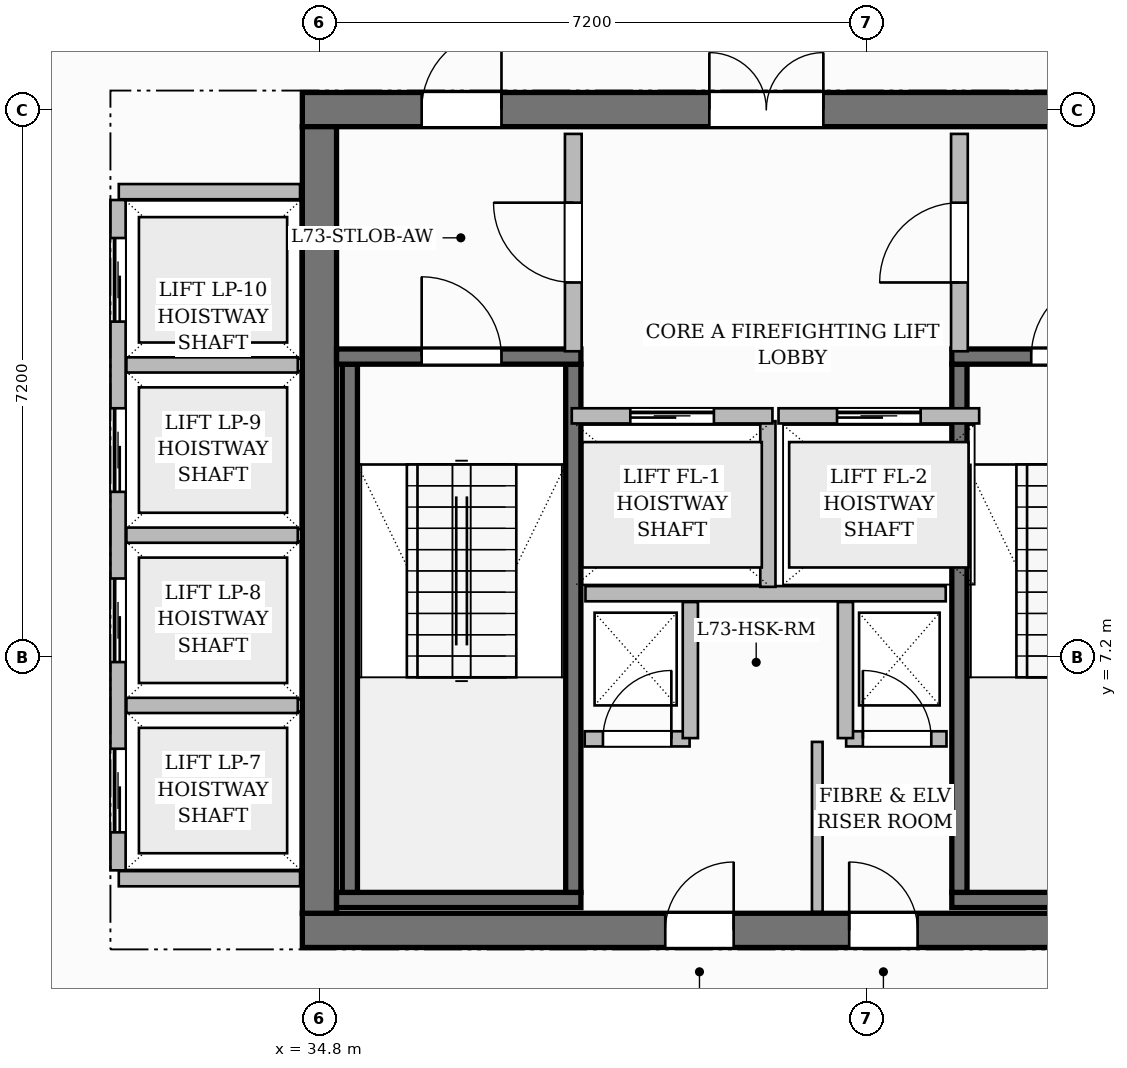
"""IFC4 building model, lengths in metres.
Left out: names, types, materials, properties, quantities, classifications, styles, units other than length and angle.
Written with IfcOpenShell. Run it as: python <this file> out.ifc"""

import sys

from ifc_helpers import new_model, si_unit, direction, frame, frame_2d, origin, place, context, subcontext, project, spatial, rectangle, extrude, source, transform, mapped, element, fill, save


model = new_model("IFC4")
c1 = context("Model", 3, precision=1e-05, world=origin(), true_north=direction((0.0, 1.0)))
c2 = subcontext(c1, "Body", "Model", "MODEL_VIEW")
j1 = project(units=[si_unit("LENGTHUNIT", "METRE"), si_unit("PLANEANGLEUNIT", "RADIAN")], contexts=[c1])
p1 = place(None, origin())
s1 = spatial("IfcSite", under=j1, at=p1, CompositionType="ELEMENT")
p2 = place(p1, origin())
s2 = spatial("IfcBuilding", under=s1, at=p2, CompositionType="ELEMENT")
p3 = place(p2, frame((0.0, 0.0, 290.45)))
s3 = spatial("IfcBuildingStorey", under=s2, at=p3, CompositionType="ELEMENT", Elevation=290.45)
p4 = place(p3, frame((34.575, 3.6, 0.0), z_axis=(0.0, 0.0, 1.0), x_axis=(1.0, 0.0, 0.0)))
e1 = element("IfcWall", 1, at=p4, inside=s3, PredefinedType="SHEAR", context=c2, shape_type="SweptSolid", body=[
    extrude(rectangle(XDim=15.45, YDim=0.45, at=frame_2d((7.725, 0.0))), origin(), (0.0, 0.0, 1.0), 3.85),
])
p5 = place(p4, frame((4.775, 0.0, 0.0)))
e2 = element("IfcOpeningElement", 2, at=p5, cuts=e1, PredefinedType="OPENING", context=c2, shape_type="SweptSolid", body=[
    extrude(rectangle(XDim=0.9, YDim=2.1, at=frame_2d((0.45, 1.05))), frame((0.0, 0.235, 0.0), z_axis=(0.0, -1.0, 0.0), x_axis=(1.0, 0.0, 0.0)), (0.0, 0.0, 1.0), 0.47),
])
p6 = place(p4, frame((7.195, 0.0, 0.0)))
e3 = element("IfcOpeningElement", 3, at=p6, cuts=e1, PredefinedType="OPENING", context=c2, shape_type="SweptSolid", body=[
    extrude(rectangle(XDim=0.9, YDim=2.1, at=frame_2d((0.45, 1.05))), frame((0.0, 0.235, 0.0), z_axis=(0.0, -1.0, 0.0), x_axis=(1.0, 0.0, 0.0)), (0.0, 0.0, 1.0), 0.47),
])
p7 = place(p3, frame((34.575, 14.4, 0.0), z_axis=(0.0, 0.0, 1.0), x_axis=(1.0, 0.0, 0.0)))
e4 = element("IfcWall", 4, at=p7, inside=s3, PredefinedType="SHEAR", context=c2, shape_type="SweptSolid", body=[
    extrude(rectangle(XDim=15.45, YDim=0.45, at=frame_2d((7.725, 0.0))), origin(), (0.0, 0.0, 1.0), 3.85),
])
p8 = place(p7, frame((5.355, 0.0, 0.0)))
e5 = element("IfcOpeningElement", 5, at=p8, cuts=e4, PredefinedType="OPENING", context=c2, shape_type="SweptSolid", body=[
    extrude(rectangle(XDim=1.5, YDim=2.2, at=frame_2d((0.75, 1.1))), frame((0.0, 0.235, 0.0), z_axis=(0.0, -1.0, 0.0), x_axis=(1.0, 0.0, 0.0)), (0.0, 0.0, 1.0), 0.47),
])
p9 = place(p7, frame((1.57, 0.0, 0.0)))
e6 = element("IfcOpeningElement", 6, at=p9, cuts=e4, PredefinedType="OPENING", context=c2, shape_type="SweptSolid", body=[
    extrude(rectangle(XDim=1.05, YDim=2.15, at=frame_2d((0.525, 1.075))), frame((0.0, 0.235, 0.0), z_axis=(0.0, -1.0, 0.0), x_axis=(1.0, 0.0, 0.0)), (0.0, 0.0, 1.0), 0.47),
])
p10 = place(p7, frame((11.2, 0.0, 0.0)))
e7 = element("IfcOpeningElement", 7, at=p10, cuts=e4, PredefinedType="OPENING", context=c2, shape_type="SweptSolid", body=[
    extrude(rectangle(XDim=1.05, YDim=2.15, at=frame_2d((0.525, 1.075))), frame((0.0, 0.235, 0.0), z_axis=(0.0, -1.0, 0.0), x_axis=(1.0, 0.0, 0.0)), (0.0, 0.0, 1.0), 0.47),
])
p11 = place(p3, frame((34.8, 3.825, 0.0), z_axis=(0.0, 0.0, 1.0), x_axis=(0.0, 1.0, 0.0)))
e8 = element("IfcWall", 8, at=p11, inside=s3, PredefinedType="SHEAR", context=c2, shape_type="SweptSolid", body=[
    extrude(rectangle(XDim=10.35, YDim=0.45, at=frame_2d((5.175, 0.0))), origin(), (0.0, 0.0, 1.0), 3.85),
])
p12 = place(p3, frame((35.025, 4.0, 0.0), z_axis=(0.0, 0.0, 1.0), x_axis=(1.0, 0.0, 0.0)))
e9 = element("IfcWall", 9, at=p12, inside=s3, PredefinedType="SHEAR", context=c2, shape_type="SweptSolid", body=[
    extrude(rectangle(XDim=3.215, YDim=0.2, at=frame_2d((1.607, 0.0))), origin(), (0.0, 0.0, 1.0), 3.85),
])
for number, where, z_axis, x_axis in (
    (10, (35.2, 4.1, 0.0), (0.0, 0.0, 1.0), (0.0, 1.0, 0.0)),
    (11, (38.14, 4.1, 0.0), (0.0, 0.0, 1.0), (0.0, 1.0, 0.0)),
):
    element("IfcWall", number, at=place(p3, frame(where, z_axis=z_axis, x_axis=x_axis)), inside=s3, PredefinedType="SHEAR", context=c2, shape_type="SweptSolid", body=[
        extrude(rectangle(XDim=6.95, YDim=0.2, at=frame_2d((3.475, 0.0))), origin(), (0.0, 0.0, 1.0), 3.85),
    ])
p13 = place(p3, frame((35.025, 11.15, 0.0), z_axis=(0.0, 0.0, 1.0), x_axis=(1.0, 0.0, 0.0)))
e12 = element("IfcWall", 12, at=p13, inside=s3, PredefinedType="SHEAR", context=c2, shape_type="SweptSolid", body=[
    extrude(rectangle(XDim=3.215, YDim=0.2, at=frame_2d((1.607, 0.0))), origin(), (0.0, 0.0, 1.0), 3.85),
])
p14 = place(p13, frame((1.12, 0.0, 0.0)))
e13 = element("IfcOpeningElement", 13, at=p14, cuts=e12, PredefinedType="OPENING", context=c2, shape_type="SweptSolid", body=[
    extrude(rectangle(XDim=1.05, YDim=2.2, at=frame_2d((0.525, 1.1))), frame((0.0, 0.11, 0.0), z_axis=(0.0, -1.0, 0.0), x_axis=(1.0, 0.0, 0.0)), (0.0, 0.0, 1.0), 0.22),
])
p15 = place(p3, frame((43.12, 4.0, 0.0), z_axis=(0.0, 0.0, 1.0), x_axis=(1.0, 0.0, 0.0)))
e14 = element("IfcWall", 14, at=p15, inside=s3, PredefinedType="SHEAR", context=c2, shape_type="SweptSolid", body=[
    extrude(rectangle(XDim=6.455, YDim=0.2, at=frame_2d((3.228, 0.0))), origin(), (0.0, 0.0, 1.0), 3.85),
])
p16 = place(p3, frame((43.22, 4.1, 0.0), z_axis=(0.0, 0.0, 1.0), x_axis=(0.0, 1.0, 0.0)))
e15 = element("IfcWall", 15, at=p16, inside=s3, PredefinedType="SHEAR", context=c2, shape_type="SweptSolid", body=[
    extrude(rectangle(XDim=6.95, YDim=0.2, at=frame_2d((3.475, 0.0))), origin(), (0.0, 0.0, 1.0), 3.85),
])
p17 = place(p3, frame((43.12, 11.15, 0.0), z_axis=(0.0, 0.0, 1.0), x_axis=(1.0, 0.0, 0.0)))
e16 = element("IfcWall", 16, at=p17, inside=s3, PredefinedType="SHEAR", context=c2, shape_type="SweptSolid", body=[
    extrude(rectangle(XDim=6.455, YDim=0.2, at=frame_2d((3.228, 0.0))), origin(), (0.0, 0.0, 1.0), 3.85),
])
p18 = place(p17, frame((1.045, 0.0, 0.0)))
e17 = element("IfcOpeningElement", 17, at=p18, cuts=e16, PredefinedType="OPENING", context=c2, shape_type="SweptSolid", body=[
    extrude(rectangle(XDim=1.05, YDim=2.2, at=frame_2d((0.525, 1.1))), frame((0.0, 0.11, 0.0), z_axis=(0.0, -1.0, 0.0), x_axis=(1.0, 0.0, 0.0)), (0.0, 0.0, 1.0), 0.22),
])
p19 = place(p17, frame((4.125, 0.0, 0.0)))
e18 = element("IfcOpeningElement", 18, at=p19, cuts=e16, PredefinedType="OPENING", context=c2, shape_type="SweptSolid", body=[
    extrude(rectangle(XDim=1.05, YDim=2.2, at=frame_2d((0.525, 1.1))), frame((0.0, 0.11, 0.0), z_axis=(0.0, -1.0, 0.0), x_axis=(1.0, 0.0, 0.0)), (0.0, 0.0, 1.0), 0.22),
])
p20 = place(p3, frame((38.3, 8.03, 0.0), z_axis=(0.0, 0.0, 1.0), x_axis=(1.0, 0.0, 0.0)))
e19 = element("IfcWall", 19, at=p20, inside=s3, PredefinedType="PARTITIONING", context=c2, shape_type="SweptSolid", body=[
    extrude(rectangle(XDim=4.74, YDim=0.2, at=frame_2d((2.37, 0.0))), origin(), (0.0, 0.0, 1.0), 3.55),
])
p21 = place(p3, frame((40.7, 8.12, 0.0), z_axis=(0.0, 0.0, 1.0), x_axis=(0.0, 1.0, 0.0)))
e20 = element("IfcWall", 20, at=p21, inside=s3, PredefinedType="PARTITIONING", context=c2, shape_type="SweptSolid", body=[
    extrude(rectangle(XDim=2.18, YDim=0.2, at=frame_2d((1.09, 0.0))), origin(), (0.0, 0.0, 1.0), 3.55),
])
p22 = place(p3, frame((38.14, 11.22, 0.0), z_axis=(0.0, 0.0, 1.0), x_axis=(0.0, 1.0, 0.0)))
e21 = element("IfcWall", 21, at=p22, inside=s3, PredefinedType="PARTITIONING", context=c2, shape_type="SweptSolid", body=[
    extrude(rectangle(XDim=2.86, YDim=0.22, at=frame_2d((1.43, 0.0))), origin(), (0.0, 0.0, 1.0), 3.55),
])
p23 = place(p22, frame((0.905, 0.0, 0.0)))
e22 = element("IfcOpeningElement", 22, at=p23, cuts=e21, PredefinedType="OPENING", context=c2, shape_type="SweptSolid", body=[
    extrude(rectangle(XDim=1.05, YDim=2.15, at=frame_2d((0.525, 1.075))), frame((0.0, 0.12, 0.0), z_axis=(0.0, -1.0, 0.0), x_axis=(1.0, 0.0, 0.0)), (0.0, 0.0, 1.0), 0.24),
])
p24 = place(p3, frame((43.22, 11.22, 0.0), z_axis=(0.0, 0.0, 1.0), x_axis=(0.0, 1.0, 0.0)))
e23 = element("IfcWall", 23, at=p24, inside=s3, PredefinedType="PARTITIONING", context=c2, shape_type="SweptSolid", body=[
    extrude(rectangle(XDim=2.86, YDim=0.22, at=frame_2d((1.43, 0.0))), origin(), (0.0, 0.0, 1.0), 3.55),
])
p25 = place(p24, frame((0.905, 0.0, 0.0)))
e24 = element("IfcOpeningElement", 24, at=p25, cuts=e23, PredefinedType="OPENING", context=c2, shape_type="SweptSolid", body=[
    extrude(rectangle(XDim=1.05, YDim=2.15, at=frame_2d((0.525, 1.075))), frame((0.0, 0.12, 0.0), z_axis=(0.0, -1.0, 0.0), x_axis=(1.0, 0.0, 0.0)), (0.0, 0.0, 1.0), 0.24),
])
p26 = place(p3, frame((38.29, 6.12, 0.0), z_axis=(0.0, 0.0, 1.0), x_axis=(1.0, 0.0, 0.0)))
e25 = element("IfcWall", 25, at=p26, inside=s3, PredefinedType="PARTITIONING", context=c2, shape_type="SweptSolid", body=[
    extrude(rectangle(XDim=1.38, YDim=0.2, at=frame_2d((0.69, 0.0))), origin(), (0.0, 0.0, 1.0), 3.55),
])
p27 = place(p26, frame((0.24, 0.0, 0.0)))
e26 = element("IfcOpeningElement", 26, at=p27, cuts=e25, PredefinedType="OPENING", context=c2, shape_type="SweptSolid", body=[
    extrude(rectangle(XDim=0.9, YDim=2.1, at=frame_2d((0.45, 1.05))), frame((0.0, 0.11, 0.0), z_axis=(0.0, -1.0, 0.0), x_axis=(1.0, 0.0, 0.0)), (0.0, 0.0, 1.0), 0.22),
])
p28 = place(p3, frame((39.68, 6.13, 0.0), z_axis=(0.0, 0.0, 1.0), x_axis=(0.0, 1.0, 0.0)))
e27 = element("IfcWall", 27, at=p28, inside=s3, PredefinedType="PARTITIONING", context=c2, shape_type="SweptSolid", body=[
    extrude(rectangle(XDim=1.79, YDim=0.2, at=frame_2d((0.895, 0.0))), origin(), (0.0, 0.0, 1.0), 3.55),
])
p29 = place(p3, frame((41.73, 6.12, 0.0), z_axis=(0.0, 0.0, 1.0), x_axis=(1.0, 0.0, 0.0)))
e28 = element("IfcWall", 28, at=p29, inside=s3, PredefinedType="PARTITIONING", context=c2, shape_type="SweptSolid", body=[
    extrude(rectangle(XDim=1.32, YDim=0.2, at=frame_2d((0.66, 0.0))), origin(), (0.0, 0.0, 1.0), 3.55),
])
p30 = place(p29, frame((0.22, 0.0, 0.0)))
e29 = element("IfcOpeningElement", 29, at=p30, cuts=e28, PredefinedType="OPENING", context=c2, shape_type="SweptSolid", body=[
    extrude(rectangle(XDim=0.9, YDim=2.1, at=frame_2d((0.45, 1.05))), frame((0.0, 0.11, 0.0), z_axis=(0.0, -1.0, 0.0), x_axis=(1.0, 0.0, 0.0)), (0.0, 0.0, 1.0), 0.22),
])
p31 = place(p3, frame((41.72, 6.13, 0.0), z_axis=(0.0, 0.0, 1.0), x_axis=(0.0, 1.0, 0.0)))
e30 = element("IfcWall", 30, at=p31, inside=s3, PredefinedType="PARTITIONING", context=c2, shape_type="SweptSolid", body=[
    extrude(rectangle(XDim=1.79, YDim=0.2, at=frame_2d((0.895, 0.0))), origin(), (0.0, 0.0, 1.0), 3.55),
])
p32 = place(p3, frame((41.35, 3.845, 0.0), z_axis=(0.0, 0.0, 1.0), x_axis=(0.0, 1.0, 0.0)))
e31 = element("IfcWall", 31, at=p32, inside=s3, PredefinedType="PARTITIONING", context=c2, shape_type="SweptSolid", body=[
    extrude(rectangle(XDim=2.235, YDim=0.14, at=frame_2d((1.118, 0.0))), origin(), (0.0, 0.0, 1.0), 3.55),
])
for number, where, z_axis, x_axis in (
    (32, (32.16, 4.28, 0.0), (0.0, 0.0, 1.0), (1.0, 0.0, 0.0)),
    (33, (32.16, 13.32, 0.0), (0.0, 0.0, 1.0), (1.0, 0.0, 0.0)),
):
    element("IfcWall", number, at=place(p3, frame(where, z_axis=z_axis, x_axis=x_axis)), inside=s3, PredefinedType="PARTITIONING", context=c2, shape_type="SweptSolid", body=[
        extrude(rectangle(XDim=2.385, YDim=0.2, at=frame_2d((1.192, 0.0))), origin(), (0.0, 0.0, 1.0), 3.55),
    ])
p33 = place(p3, frame((32.15, 4.39, 0.0), z_axis=(0.0, 0.0, 1.0), x_axis=(0.0, 1.0, 0.0)))
e34 = element("IfcWall", 34, at=p33, inside=s3, PredefinedType="PARTITIONING", context=c2, shape_type="SweptSolid", body=[
    extrude(rectangle(XDim=8.82, YDim=0.2, at=frame_2d((4.41, 0.0))), origin(), (0.0, 0.0, 1.0), 3.55),
])
p34 = place(p33, frame((0.5, 0.0, 0.0)))
e35 = element("IfcOpeningElement", 35, at=p34, cuts=e34, PredefinedType="OPENING", context=c2, shape_type="SweptSolid", body=[
    extrude(rectangle(XDim=1.1, YDim=2.2, at=frame_2d((0.55, 1.1))), frame((0.0, 0.11, 0.0), z_axis=(0.0, -1.0, 0.0), x_axis=(1.0, 0.0, 0.0)), (0.0, 0.0, 1.0), 0.22),
])
p35 = place(p33, frame((2.74, 0.0, 0.0)))
e36 = element("IfcOpeningElement", 36, at=p35, cuts=e34, PredefinedType="OPENING", context=c2, shape_type="SweptSolid", body=[
    extrude(rectangle(XDim=1.1, YDim=2.2, at=frame_2d((0.55, 1.1))), frame((0.0, 0.11, 0.0), z_axis=(0.0, -1.0, 0.0), x_axis=(1.0, 0.0, 0.0)), (0.0, 0.0, 1.0), 0.22),
])
p36 = place(p33, frame((4.98, 0.0, 0.0)))
e37 = element("IfcOpeningElement", 37, at=p36, cuts=e34, PredefinedType="OPENING", context=c2, shape_type="SweptSolid", body=[
    extrude(rectangle(XDim=1.1, YDim=2.2, at=frame_2d((0.55, 1.1))), frame((0.0, 0.11, 0.0), z_axis=(0.0, -1.0, 0.0), x_axis=(1.0, 0.0, 0.0)), (0.0, 0.0, 1.0), 0.22),
])
p37 = place(p33, frame((7.22, 0.0, 0.0)))
e38 = element("IfcOpeningElement", 38, at=p37, cuts=e34, PredefinedType="OPENING", context=c2, shape_type="SweptSolid", body=[
    extrude(rectangle(XDim=1.1, YDim=2.2, at=frame_2d((0.55, 1.1))), frame((0.0, 0.11, 0.0), z_axis=(0.0, -1.0, 0.0), x_axis=(1.0, 0.0, 0.0)), (0.0, 0.0, 1.0), 0.22),
])
for number, where, z_axis, x_axis in (
    (39, (32.26, 6.56, 0.0), (0.0, 0.0, 1.0), (1.0, 0.0, 0.0)),
    (40, (32.26, 8.8, 0.0), (0.0, 0.0, 1.0), (1.0, 0.0, 0.0)),
    (41, (32.26, 11.04, 0.0), (0.0, 0.0, 1.0), (1.0, 0.0, 0.0)),
):
    element("IfcWall", number, at=place(p3, frame(where, z_axis=z_axis, x_axis=x_axis)), inside=s3, PredefinedType="PARTITIONING", context=c2, shape_type="SweptSolid", body=[
        extrude(rectangle(XDim=2.255, YDim=0.2, at=frame_2d((1.127, 0.0))), origin(), (0.0, 0.0, 1.0), 3.55),
    ])
p38 = place(p3, frame((38.12, 10.37, 0.0), z_axis=(0.0, 0.0, 1.0), x_axis=(1.0, 0.0, 0.0)))
e42 = element("IfcWall", 42, at=p38, inside=s3, PredefinedType="PARTITIONING", context=c2, shape_type="SweptSolid", body=[
    extrude(rectangle(XDim=2.64, YDim=0.2, at=frame_2d((1.32, 0.0))), origin(), (0.0, 0.0, 1.0), 3.55),
])
p39 = place(p38, frame((0.77, 0.0, 0.0)))
e43 = element("IfcOpeningElement", 43, at=p39, cuts=e42, PredefinedType="OPENING", context=c2, shape_type="SweptSolid", body=[
    extrude(rectangle(XDim=1.1, YDim=2.2, at=frame_2d((0.55, 1.1))), frame((0.0, 0.11, 0.0), z_axis=(0.0, -1.0, 0.0), x_axis=(1.0, 0.0, 0.0)), (0.0, 0.0, 1.0), 0.22),
])
p40 = place(p3, frame((40.84, 10.37, 0.0), z_axis=(0.0, 0.0, 1.0), x_axis=(1.0, 0.0, 0.0)))
e44 = element("IfcWall", 44, at=p40, inside=s3, PredefinedType="PARTITIONING", context=c2, shape_type="SweptSolid", body=[
    extrude(rectangle(XDim=2.64, YDim=0.2, at=frame_2d((1.32, 0.0))), origin(), (0.0, 0.0, 1.0), 3.55),
])
p41 = place(p40, frame((0.77, 0.0, 0.0)))
e45 = element("IfcOpeningElement", 45, at=p41, cuts=e44, PredefinedType="OPENING", context=c2, shape_type="SweptSolid", body=[
    extrude(rectangle(XDim=1.1, YDim=2.2, at=frame_2d((0.55, 1.1))), frame((0.0, 0.11, 0.0), z_axis=(0.0, -1.0, 0.0), x_axis=(1.0, 0.0, 0.0)), (0.0, 0.0, 1.0), 0.22),
])
m1 = source(origin(), c2, "Body", "SweptSolid", [
    extrude(rectangle(XDim=1.05, YDim=2.2, at=frame_2d((0.525, 1.1))), frame((0.0, 0.025, 0.0), z_axis=(0.0, -1.0, 0.0), x_axis=(1.0, 0.0, 0.0)), (0.0, 0.0, 1.0), 0.05),
])
p42 = place(p14, origin())
e46 = element("IfcDoor", 46, at=p42, inside=s3, OperationType="SINGLE_SWING_LEFT", PredefinedType="DOOR", context=c2, shape_type="MappedRepresentation", body=[
    mapped(m1, transform((0.0, 0.0, 0.0), scale=1.0)),
])
fill(e13, e46)
p43 = place(p18, origin())
e47 = element("IfcDoor", 47, at=p43, inside=s3, OperationType="SINGLE_SWING_RIGHT", PredefinedType="DOOR", context=c2, shape_type="MappedRepresentation", body=[
    mapped(m1, transform((0.0, 0.0, 0.0), scale=1.0)),
])
fill(e17, e47)
m2 = source(origin(), c2, "Body", "SweptSolid", [
    extrude(rectangle(XDim=1.05, YDim=2.15, at=frame_2d((0.525, 1.075))), frame((0.0, 0.025, 0.0), z_axis=(0.0, -1.0, 0.0), x_axis=(1.0, 0.0, 0.0)), (0.0, 0.0, 1.0), 0.05),
])
p44 = place(p23, origin())
e48 = element("IfcDoor", 48, at=p44, inside=s3, OperationType="SINGLE_SWING_RIGHT", PredefinedType="DOOR", context=c2, shape_type="MappedRepresentation", body=[
    mapped(m2, transform((0.0, 0.0, 0.0), scale=1.0)),
])
fill(e22, e48)
p45 = place(p25, origin())
e49 = element("IfcDoor", 49, at=p45, inside=s3, OperationType="SINGLE_SWING_LEFT", PredefinedType="DOOR", context=c2, shape_type="MappedRepresentation", body=[
    mapped(m2, transform((0.0, 0.0, 0.0), scale=1.0)),
])
fill(e24, e49)
m3 = source(origin(), c2, "Body", "SweptSolid", [
    extrude(rectangle(XDim=1.5, YDim=2.2, at=frame_2d((0.75, 1.1))), frame((0.0, 0.025, 0.0), z_axis=(0.0, -1.0, 0.0), x_axis=(1.0, 0.0, 0.0)), (0.0, 0.0, 1.0), 0.05),
])
p46 = place(p8, origin())
e50 = element("IfcDoor", 50, at=p46, inside=s3, OperationType="DOUBLE_DOOR_SINGLE_SWING", PredefinedType="DOOR", context=c2, shape_type="MappedRepresentation", body=[
    mapped(m3, transform((0.0, 0.0, 0.0), scale=1.0)),
])
fill(e5, e50)
p47 = place(p9, origin())
e51 = element("IfcDoor", 51, at=p47, inside=s3, OperationType="SINGLE_SWING_RIGHT", PredefinedType="DOOR", context=c2, shape_type="MappedRepresentation", body=[
    mapped(m2, transform((0.0, 0.0, 0.0), scale=1.0)),
])
fill(e6, e51)
m4 = source(origin(), c2, "Body", "SweptSolid", [
    extrude(rectangle(XDim=0.9, YDim=2.1, at=frame_2d((0.45, 1.05))), frame((0.0, 0.025, 0.0), z_axis=(0.0, -1.0, 0.0), x_axis=(1.0, 0.0, 0.0)), (0.0, 0.0, 1.0), 0.05),
])
p48 = place(p27, origin())
e52 = element("IfcDoor", 52, at=p48, inside=s3, OperationType="SINGLE_SWING_RIGHT", PredefinedType="DOOR", context=c2, shape_type="MappedRepresentation", body=[
    mapped(m4, transform((0.0, 0.0, 0.0), scale=1.0)),
])
fill(e26, e52)
p49 = place(p30, origin())
e53 = element("IfcDoor", 53, at=p49, inside=s3, OperationType="SINGLE_SWING_LEFT", PredefinedType="DOOR", context=c2, shape_type="MappedRepresentation", body=[
    mapped(m4, transform((0.0, 0.0, 0.0), scale=1.0)),
])
fill(e29, e53)
p50 = place(p5, origin())
e54 = element("IfcDoor", 54, at=p50, inside=s3, OperationType="SINGLE_SWING_RIGHT", PredefinedType="DOOR", context=c2, shape_type="MappedRepresentation", body=[
    mapped(m4, transform((0.0, 0.0, 0.0), scale=1.0)),
])
fill(e2, e54)
p51 = place(p6, origin())
e55 = element("IfcDoor", 55, at=p51, inside=s3, OperationType="SINGLE_SWING_LEFT", PredefinedType="DOOR", context=c2, shape_type="MappedRepresentation", body=[
    mapped(m4, transform((0.0, 0.0, 0.0), scale=1.0)),
])
fill(e3, e55)
m5 = source(origin(), c2, "Body", "SweptSolid", [
    extrude(rectangle(XDim=1.1, YDim=2.2, at=frame_2d((0.55, 1.1))), frame((0.0, 0.025, 0.0), z_axis=(0.0, -1.0, 0.0), x_axis=(1.0, 0.0, 0.0)), (0.0, 0.0, 1.0), 0.05),
])
p52 = place(p39, origin())
e56 = element("IfcDoor", 56, at=p52, inside=s3, OperationType="SLIDING_TO_LEFT", PredefinedType="DOOR", context=c2, shape_type="MappedRepresentation", body=[
    mapped(m5, transform((0.0, 0.0, 0.0), scale=1.0)),
])
fill(e43, e56)
p53 = place(p41, origin())
e57 = element("IfcDoor", 57, at=p53, inside=s3, OperationType="SLIDING_TO_LEFT", PredefinedType="DOOR", context=c2, shape_type="MappedRepresentation", body=[
    mapped(m5, transform((0.0, 0.0, 0.0), scale=1.0)),
])
fill(e45, e57)
p54 = place(p34, origin())
e58 = element("IfcDoor", 58, at=p54, inside=s3, OperationType="SLIDING_TO_LEFT", PredefinedType="DOOR", context=c2, shape_type="MappedRepresentation", body=[
    mapped(m5, transform((0.0, 0.0, 0.0), scale=1.0)),
])
fill(e35, e58)
p55 = place(p35, origin())
e59 = element("IfcDoor", 59, at=p55, inside=s3, OperationType="SLIDING_TO_LEFT", PredefinedType="DOOR", context=c2, shape_type="MappedRepresentation", body=[
    mapped(m5, transform((0.0, 0.0, 0.0), scale=1.0)),
])
fill(e36, e59)
p56 = place(p36, origin())
e60 = element("IfcDoor", 60, at=p56, inside=s3, OperationType="SLIDING_TO_LEFT", PredefinedType="DOOR", context=c2, shape_type="MappedRepresentation", body=[
    mapped(m5, transform((0.0, 0.0, 0.0), scale=1.0)),
])
fill(e37, e60)
p57 = place(p37, origin())
e61 = element("IfcDoor", 61, at=p57, inside=s3, OperationType="SLIDING_TO_LEFT", PredefinedType="DOOR", context=c2, shape_type="MappedRepresentation", body=[
    mapped(m5, transform((0.0, 0.0, 0.0), scale=1.0)),
])
fill(e38, e61)
save(model, sys.argv[1])
